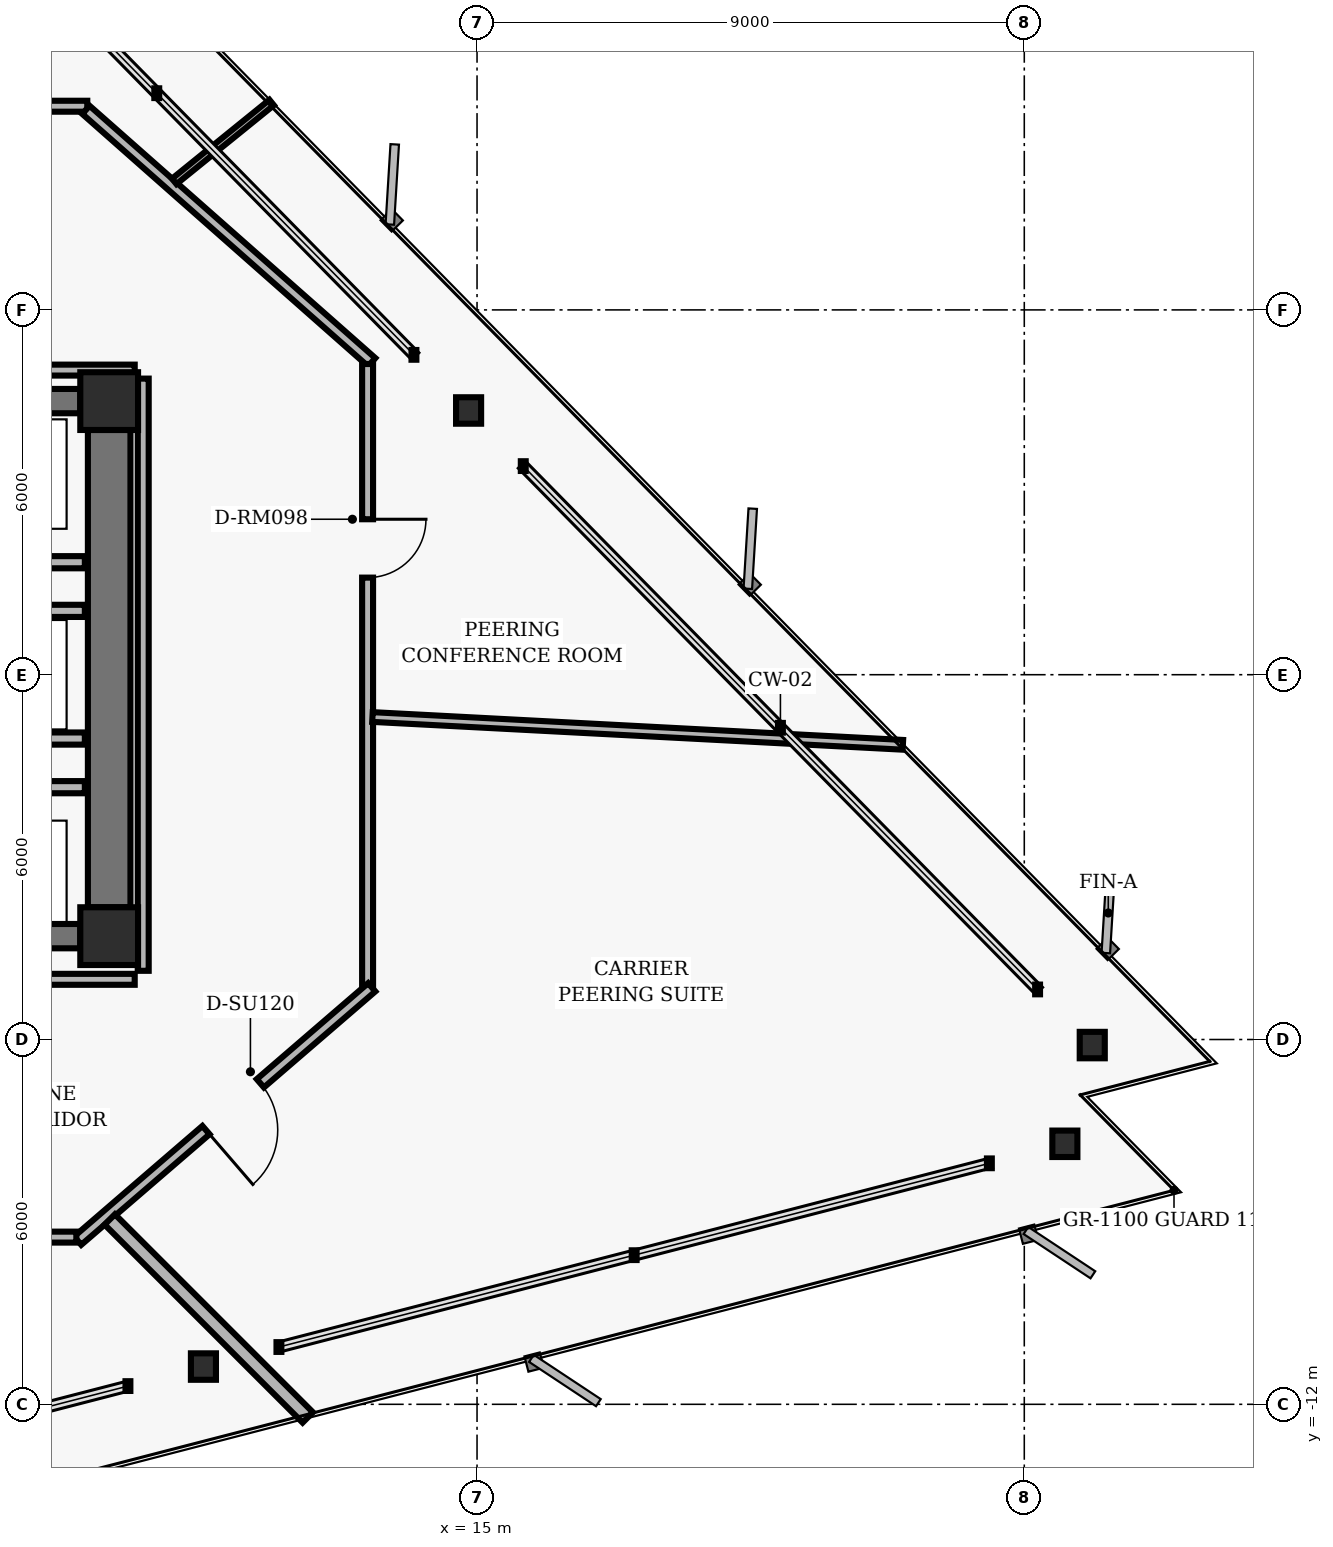
"""IFC4 building model, lengths in metres.
Left out: names, types, materials, properties, quantities, classifications, styles, units other than length and angle.
Written with IfcOpenShell. Run it as: python <this file> out.ifc"""

import sys

from ifc_helpers import new_model, si_unit, direction, frame, frame_2d, origin, origin_2d, place, context, subcontext, project, spatial, rectangle, hollow_rectangle, i_section, extrude, element, fill, save


model = new_model("IFC4")
c1 = context("Model", 3, precision=1e-05, world=origin(), true_north=direction((0.0, 1.0)))
c2 = subcontext(c1, "Body", "Model", "MODEL_VIEW")
j1 = project(units=[si_unit("LENGTHUNIT", "METRE"), si_unit("PLANEANGLEUNIT", "RADIAN")], contexts=[c1])
p1 = place(None, origin())
s1 = spatial("IfcSite", under=j1, at=p1, CompositionType="ELEMENT")
p2 = place(p1, origin())
s2 = spatial("IfcBuilding", under=s1, at=p2, CompositionType="ELEMENT")
p3 = place(p2, frame((0.0, 0.0, 91.68)))
s3 = spatial("IfcBuildingStorey", under=s2, at=p3, CompositionType="ELEMENT", Elevation=91.68)
for number, where, z_axis, x_axis in (
    (1, (8.95, 4.5, 0.0), (0.0, 0.0, 1.0), (1.0, 0.0, 0.0)),
    (2, (8.95, -4.3, 0.0), (0.0, 0.0, 1.0), (1.0, 0.0, 0.0)),
):
    element("IfcColumn", number, at=place(p3, frame(where, z_axis=z_axis, x_axis=x_axis)), inside=s3, PredefinedType="COLUMN", context=c2, shape_type="SweptSolid", body=[
        extrude(hollow_rectangle(XDim=0.95, YDim=0.95, WallThickness=0.06, InnerFilletRadius=0.02, OuterFilletRadius=0.04, at=origin_2d()), origin(), (0.0, 0.0, 1.0), 3.04),
    ])
p4 = place(p3, frame((8.95, -3.825, 0.0), z_axis=(0.0, 0.0, 1.0), x_axis=(0.0, 1.0, 0.0)))
e3 = element("IfcWall", 3, at=p4, inside=s3, PredefinedType="SHEAR", context=c2, shape_type="SweptSolid", body=[
    extrude(rectangle(XDim=7.85, YDim=0.7, at=frame_2d((3.925, 0.0))), origin(), (0.0, 0.0, 1.0), 2.788),
])
for number, where, z_axis, x_axis in (
    (4, (6.525, 4.5, 0.0), (0.0, 0.0, 1.0), (1.0, 0.0, 0.0)),
    (5, (6.525, -4.3, 0.0), (0.0, 0.0, 1.0), (1.0, 0.0, 0.0)),
):
    element("IfcWall", number, at=place(p3, frame(where, z_axis=z_axis, x_axis=x_axis)), inside=s3, PredefinedType="SHEAR", context=c2, shape_type="SweptSolid", body=[
        extrude(rectangle(XDim=1.95, YDim=0.4, at=frame_2d((0.975, 0.0))), origin(), (0.0, 0.0, 1.0), 2.788),
    ])
for number, where, z_axis, x_axis in (
    (6, (25.118, -6.092, 0.0), (0.0, 0.0, 1.0), (1.0, 0.0, 0.0)),
    (7, (14.861, 4.346, 0.0), (0.0, 0.0, 1.0), (1.0, 0.0, 0.0)),
    (8, (10.5, -11.379, 0.0), (0.0, 0.0, 1.0), (1.0, 0.0, 0.0)),
    (9, (24.667, -7.715, 0.0), (0.0, 0.0, 1.0), (1.0, 0.0, 0.0)),
):
    element("IfcColumn", number, at=place(p3, frame(where, z_axis=z_axis, x_axis=x_axis)), inside=s3, PredefinedType="COLUMN", context=c2, shape_type="SweptSolid", body=[
        extrude(i_section(OverallWidth=0.412, OverallDepth=0.435, WebThickness=0.036, FlangeThickness=0.057, FilletRadius=0.022, at=origin_2d()), origin(), (0.0, 0.0, 1.0), 3.04),
    ])
for number, where, z_axis, x_axis in (
    (10, (6.45, -1.85, 0.0), (0.0, 0.0, 1.0), (1.0, 0.0, 0.0)),
    (11, (6.45, 1.85, 0.0), (0.0, 0.0, 1.0), (1.0, 0.0, 0.0)),
):
    element("IfcWall", number, at=place(p3, frame(where, z_axis=z_axis, x_axis=x_axis)), inside=s3, PredefinedType="PARTITIONING", context=c2, shape_type="SweptSolid", body=[
        extrude(rectangle(XDim=2.1, YDim=0.2, at=frame_2d((1.05, 0.0))), origin(), (0.0, 0.0, 1.0), 2.763),
    ])
for number, where, z_axis, x_axis in (
    (12, (6.64, -1.05, 0.0), (0.0, 0.0, 1.0), (1.0, 0.0, 0.0)),
    (13, (6.64, 1.05, 0.0), (0.0, 0.0, 1.0), (1.0, 0.0, 0.0)),
):
    element("IfcWall", number, at=place(p3, frame(where, z_axis=z_axis, x_axis=x_axis)), inside=s3, PredefinedType="PARTITIONING", context=c2, shape_type="SweptSolid", body=[
        extrude(rectangle(XDim=1.91, YDim=0.2, at=frame_2d((0.955, 0.0))), origin(), (0.0, 0.0, 1.0), 2.763),
    ])
p5 = place(p3, frame((-8.59, 9.35, 0.0), z_axis=(0.0, 0.0, 1.0), x_axis=(1.0, 0.0, 0.0)))
e14 = element("IfcWall", 14, at=p5, inside=s3, PredefinedType="PARTITIONING", context=c2, shape_type="SweptSolid", body=[
    extrude(rectangle(XDim=17.18, YDim=0.18, at=frame_2d((8.59, 0.0))), origin(), (0.0, 0.0, 1.0), 2.277),
])
p6 = place(p5, frame((12.912, 0.0, 0.0)))
e15 = element("IfcOpeningElement", 15, at=p6, cuts=e14, PredefinedType="OPENING", context=c2, shape_type="SweptSolid", body=[
    extrude(rectangle(XDim=1.18, YDim=2.02, at=frame_2d((0.59, 1.01))), frame((0.0, 0.1, 0.0), z_axis=(0.0, -1.0, 0.0), x_axis=(1.0, 0.0, 0.0)), (0.0, 0.0, 1.0), 0.2),
])
p7 = place(p5, frame((5.79, 0.0, 0.0)))
e16 = element("IfcOpeningElement", 16, at=p7, cuts=e14, PredefinedType="OPENING", context=c2, shape_type="SweptSolid", body=[
    extrude(rectangle(XDim=0.96, YDim=2.02, at=frame_2d((0.48, 1.01))), frame((0.0, 0.1, 0.0), z_axis=(0.0, -1.0, 0.0), x_axis=(1.0, 0.0, 0.0)), (0.0, 0.0, 1.0), 0.2),
])
p8 = place(p3, frame((8.567, 9.29, 0.0), z_axis=(0.0, 0.0, 1.0), x_axis=(0.749626463267, -0.66186113768, 0.0)))
e17 = element("IfcWall", 17, at=p8, inside=s3, PredefinedType="PARTITIONING", context=c2, shape_type="SweptSolid", body=[
    extrude(rectangle(XDim=6.27, YDim=0.18, at=frame_2d((3.135, 0.0))), origin(), (0.0, 0.0, 1.0), 2.277),
])
p9 = place(p3, frame((13.2, 5.11, 0.0), z_axis=(0.0, 0.0, 1.0), x_axis=(0.0, -1.0, 0.0)))
e18 = element("IfcWall", 18, at=p9, inside=s3, PredefinedType="PARTITIONING", context=c2, shape_type="SweptSolid", body=[
    extrude(rectangle(XDim=10.22, YDim=0.18, at=frame_2d((5.11, 0.0))), origin(), (0.0, 0.0, 1.0), 2.277),
])
p10 = place(p9, frame((2.553, 0.0, 0.0)))
e19 = element("IfcOpeningElement", 19, at=p10, cuts=e18, PredefinedType="OPENING", context=c2, shape_type="SweptSolid", body=[
    extrude(rectangle(XDim=0.96, YDim=2.02, at=frame_2d((0.48, 1.01))), frame((0.0, 0.1, 0.0), z_axis=(0.0, -1.0, 0.0), x_axis=(1.0, 0.0, 0.0)), (0.0, 0.0, 1.0), 0.2),
])
p11 = place(p3, frame((13.268, -5.141, 0.0), z_axis=(0.0, 0.0, 1.0), x_axis=(-0.757534501725, -0.65279512766, 0.0)))
e20 = element("IfcWall", 20, at=p11, inside=s3, PredefinedType="PARTITIONING", context=c2, shape_type="SweptSolid", body=[
    extrude(rectangle(XDim=6.385, YDim=0.18, at=frame_2d((3.192, 0.0))), origin(), (0.0, 0.0, 1.0), 2.763),
])
p12 = place(p11, frame((2.418, 0.0, 0.0)))
e21 = element("IfcOpeningElement", 21, at=p12, cuts=e20, PredefinedType="OPENING", context=c2, shape_type="SweptSolid", body=[
    extrude(rectangle(XDim=1.18, YDim=2.02, at=frame_2d((0.59, 1.01))), frame((0.0, 0.1, 0.0), z_axis=(0.0, -1.0, 0.0), x_axis=(1.0, 0.0, 0.0)), (0.0, 0.0, 1.0), 0.2),
])
p13 = place(p3, frame((8.41, -9.25, 0.0), z_axis=(0.0, 0.0, 1.0), x_axis=(-1.0, 0.0, 0.0)))
e22 = element("IfcWall", 22, at=p13, inside=s3, PredefinedType="PARTITIONING", context=c2, shape_type="SweptSolid", body=[
    extrude(rectangle(XDim=17.0, YDim=0.18, at=frame_2d((8.5, 0.0))), origin(), (0.0, 0.0, 1.0), 2.277),
])
p14 = place(p13, frame((10.795, 0.0, 0.0)))
e23 = element("IfcOpeningElement", 23, at=p14, cuts=e22, PredefinedType="OPENING", context=c2, shape_type="SweptSolid", body=[
    extrude(rectangle(XDim=0.96, YDim=2.02, at=frame_2d((0.48, 1.01))), frame((0.0, 0.1, 0.0), z_axis=(0.0, -1.0, 0.0), x_axis=(1.0, 0.0, 0.0)), (0.0, 0.0, 1.0), 0.2),
])
p15 = place(p13, frame((3.417, 0.0, 0.0)))
e24 = element("IfcOpeningElement", 24, at=p15, cuts=e22, PredefinedType="OPENING", context=c2, shape_type="SweptSolid", body=[
    extrude(rectangle(XDim=1.02, YDim=2.02, at=frame_2d((0.51, 1.01))), frame((0.0, 0.1, 0.0), z_axis=(0.0, -1.0, 0.0), x_axis=(1.0, 0.0, 0.0)), (0.0, 0.0, 1.0), 0.2),
])
p16 = place(p3, frame((6.03, -5.01, 0.0), z_axis=(0.0, 0.0, 1.0), x_axis=(1.0, 0.0, 0.0)))
e25 = element("IfcWall", 25, at=p16, inside=s3, PredefinedType="PARTITIONING", context=c2, shape_type="SweptSolid", body=[
    extrude(rectangle(XDim=3.34, YDim=0.18, at=frame_2d((1.67, 0.0))), origin(), (0.0, 0.0, 1.0), 2.763),
])
p17 = place(p3, frame((9.51, -4.87, 0.0), z_axis=(0.0, 0.0, 1.0), x_axis=(0.0, 1.0, 0.0)))
e26 = element("IfcWall", 26, at=p17, inside=s3, PredefinedType="PARTITIONING", context=c2, shape_type="SweptSolid", body=[
    extrude(rectangle(XDim=9.74, YDim=0.18, at=frame_2d((4.87, 0.0))), origin(), (0.0, 0.0, 1.0), 2.048),
])
p18 = place(p3, frame((9.37, 5.01, 0.0), z_axis=(0.0, 0.0, 1.0), x_axis=(-1.0, 0.0, 0.0)))
e27 = element("IfcWall", 27, at=p18, inside=s3, PredefinedType="PARTITIONING", context=c2, shape_type="SweptSolid", body=[
    extrude(rectangle(XDim=2.808, YDim=0.18, at=frame_2d((1.404, 0.0))), origin(), (0.0, 0.0, 1.0), 2.763),
])
p19 = place(p3, frame((8.96, -8.96, 0.0), z_axis=(0.0, 0.0, 1.0), x_axis=(0.707106781187, -0.707106781187, 0.0)))
e28 = element("IfcWall", 28, at=p19, inside=s3, PredefinedType="PARTITIONING", context=c2, shape_type="SweptSolid", body=[
    extrude(rectangle(XDim=4.605, YDim=0.24, at=frame_2d((2.303, 0.0))), origin(), (0.0, 0.0, 1.0), 2.763),
])
p20 = place(p3, frame((13.28, -0.696, 0.0), z_axis=(0.0, 0.0, 1.0), x_axis=(0.998630385284, -0.052319724644, 0.0)))
e29 = element("IfcWall", 29, at=p20, inside=s3, PredefinedType="PARTITIONING", context=c2, shape_type="SweptSolid", body=[
    extrude(rectangle(XDim=8.735, YDim=0.16, at=frame_2d((4.368, 0.0))), origin(), (0.0, 0.0, 1.0), 2.763),
])
p21 = place(p3, frame((10.02, 8.114, 0.0), z_axis=(0.0, 0.0, 1.0), x_axis=(0.777156579316, 0.62930727886, 0.0)))
e30 = element("IfcWall", 30, at=p21, inside=s3, PredefinedType="MOVABLE", context=c2, shape_type="SweptSolid", body=[
    extrude(rectangle(XDim=2.061, YDim=0.115, at=frame_2d((1.03, 0.0))), origin(), (0.0, 0.0, 1.0), 2.763),
])
p22 = place(p12, origin())
e31 = element("IfcDoor", 31, at=p22, inside=s3, OperationType="SINGLE_SWING_RIGHT", PredefinedType="DOOR", context=c2, shape_type="SweptSolid", body=[
    extrude(rectangle(XDim=1.18, YDim=2.02, at=frame_2d((0.59, 1.01))), frame((0.0, 0.025, 0.0), z_axis=(0.0, -1.0, 0.0), x_axis=(1.0, 0.0, 0.0)), (0.0, 0.0, 1.0), 0.05),
])
fill(e21, e31)
p23 = place(p10, origin())
e32 = element("IfcDoor", 32, at=p23, inside=s3, OperationType="SINGLE_SWING_LEFT", PredefinedType="DOOR", context=c2, shape_type="SweptSolid", body=[
    extrude(rectangle(XDim=0.96, YDim=2.02, at=frame_2d((0.48, 1.01))), frame((0.0, 0.025, 0.0), z_axis=(0.0, -1.0, 0.0), x_axis=(1.0, 0.0, 0.0)), (0.0, 0.0, 1.0), 0.05),
])
fill(e19, e32)
save(model, sys.argv[1])
